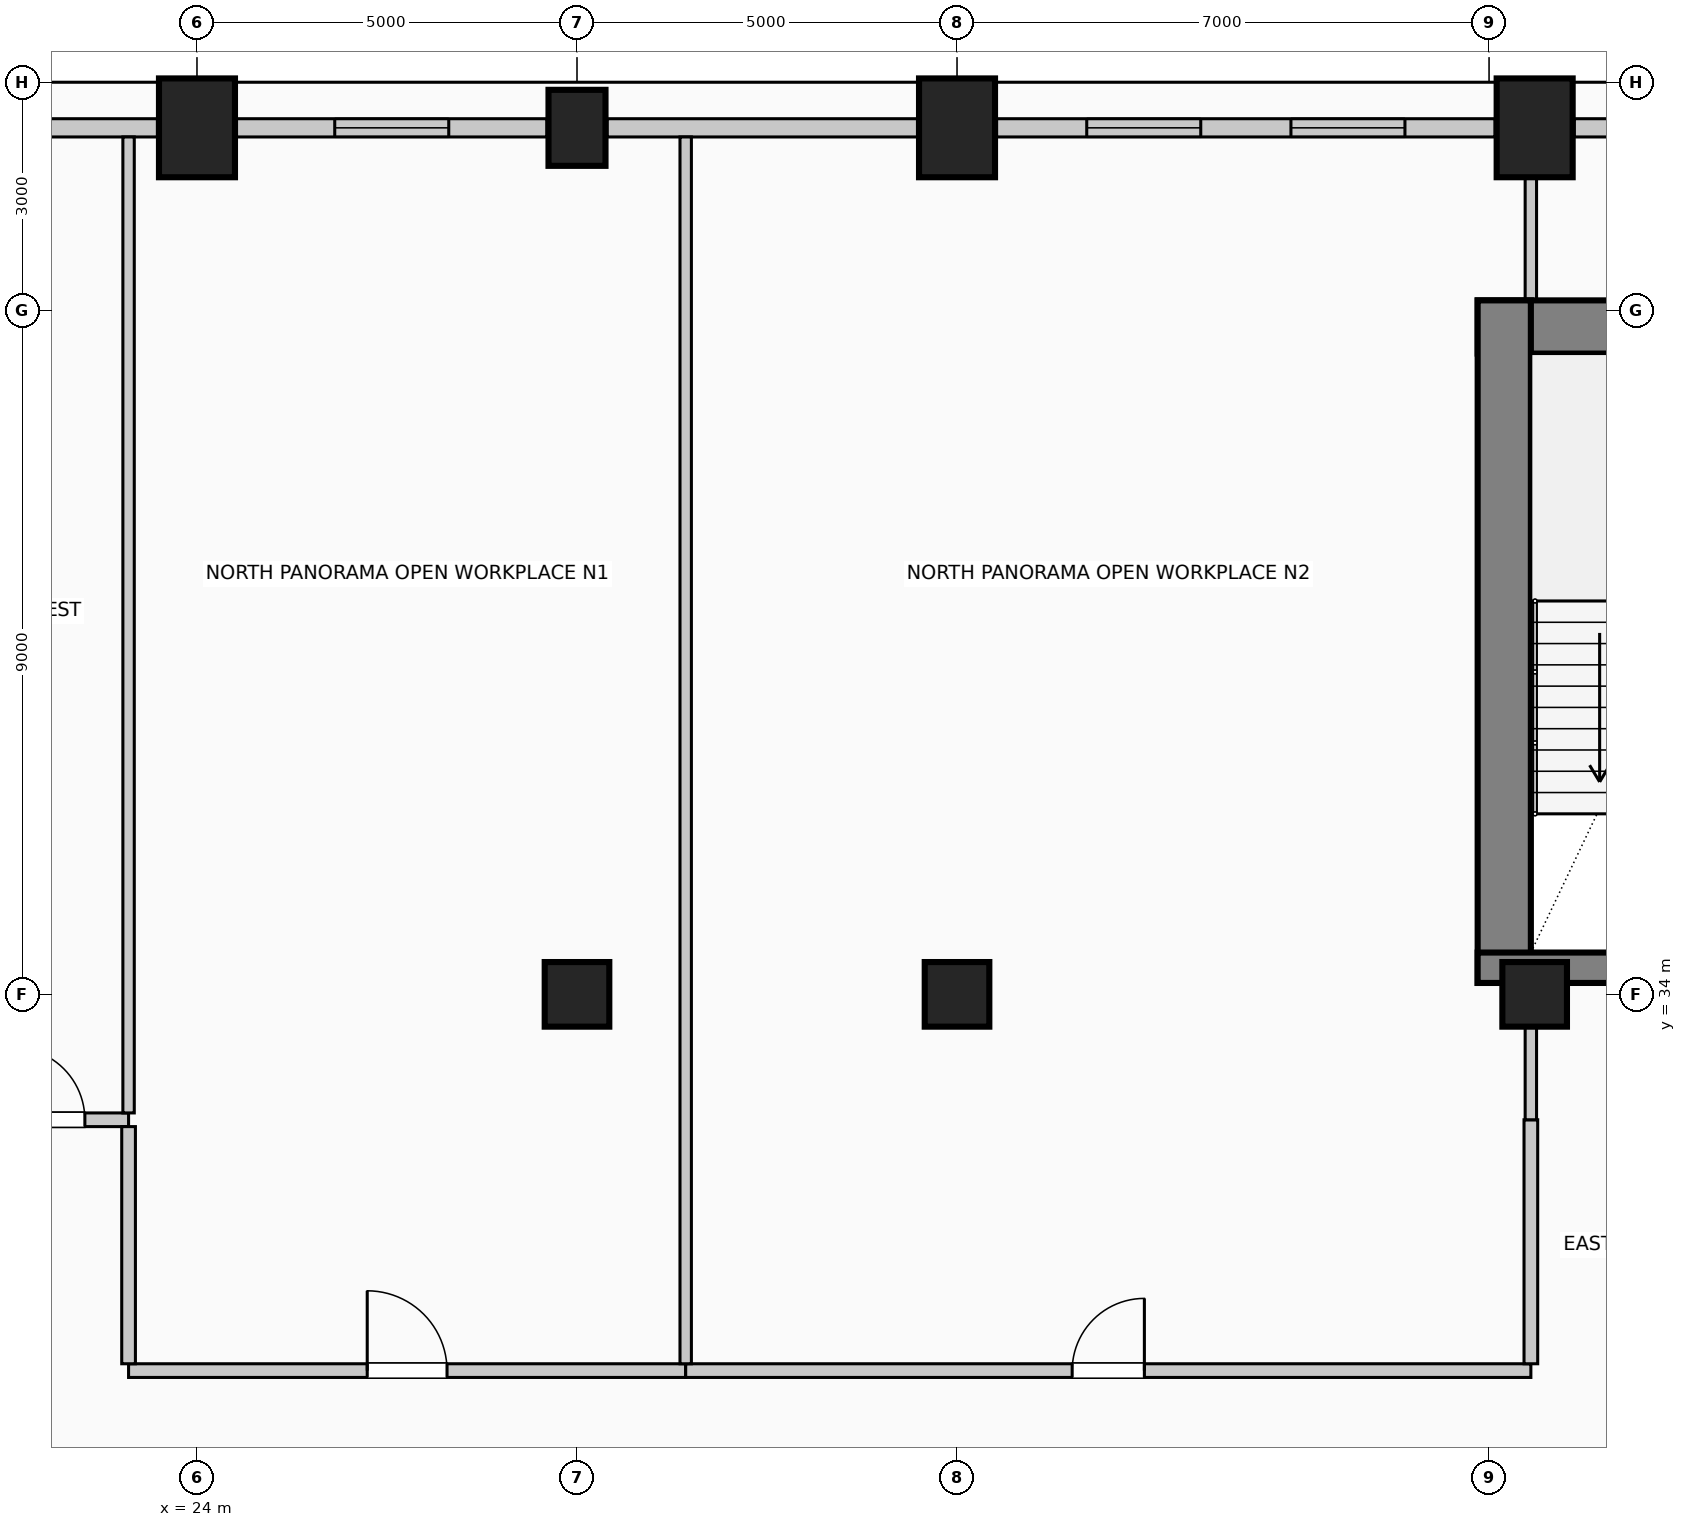
"""IFC4 building model, lengths in metres.
Left out: names, types, materials, properties, quantities, classifications, styles, units other than length and angle.
Written with IfcOpenShell. Run it as: python <this file> out.ifc"""

import sys

from ifc_helpers import new_model, si_unit, direction, frame, frame_2d, origin, origin_2d, place, context, subcontext, project, spatial, rectangle, circle, extrude, element, fill, save


model = new_model("IFC4")
c1 = context("Model", 3, precision=1e-05, world=origin(), true_north=direction((0.0, 1.0)))
c2 = subcontext(c1, "Body", "Model", "MODEL_VIEW")
j1 = project(units=[si_unit("LENGTHUNIT", "METRE"), si_unit("PLANEANGLEUNIT", "RADIAN")], contexts=[c1])
p1 = place(None, origin())
s1 = spatial("IfcSite", under=j1, at=p1, CompositionType="ELEMENT")
p2 = place(p1, origin())
s2 = spatial("IfcBuilding", under=s1, at=p2, CompositionType="ELEMENT")
p3 = place(p2, frame((0.0, 0.0, 252.6)))
s3 = spatial("IfcBuildingStorey", under=s2, at=p3, CompositionType="ELEMENT", Elevation=252.6)
p4 = place(p3, frame((40.85, 42.78, 0.0), z_axis=(0.0, 0.0, 1.0), x_axis=(1.0, 0.0, 0.0)))
e1 = element("IfcWall", 1, at=p4, inside=s3, PredefinedType="SHEAR", context=c2, shape_type="SweptSolid", body=[
    extrude(rectangle(XDim=14.3, YDim=0.7, at=frame_2d((7.15, 0.0))), origin(), (0.0, 0.0, 1.0), 4.0),
])
p5 = place(p3, frame((41.2, 34.15, 0.0), z_axis=(0.0, 0.0, 1.0), x_axis=(0.0, 1.0, 0.0)))
e2 = element("IfcWall", 2, at=p5, inside=s3, PredefinedType="SHEAR", context=c2, shape_type="SweptSolid", body=[
    extrude(rectangle(XDim=8.98, YDim=0.7, at=frame_2d((4.49, 0.0))), origin(), (0.0, 0.0, 1.0), 4.0),
])
p6 = place(p3, frame((40.85, 34.35, 0.0), z_axis=(0.0, 0.0, 1.0), x_axis=(1.0, 0.0, 0.0)))
e3 = element("IfcWall", 3, at=p6, inside=s3, PredefinedType="SHEAR", context=c2, shape_type="SweptSolid", body=[
    extrude(rectangle(XDim=4.86, YDim=0.4, at=frame_2d((2.43, 0.0))), origin(), (0.0, 0.0, 1.0), 4.0),
])
p7 = place(p6, frame((2.4, 0.0, 0.0)))
e4 = element("IfcOpeningElement", 4, at=p7, cuts=e3, PredefinedType="OPENING", context=c2, shape_type="SweptSolid", body=[
    extrude(rectangle(XDim=1.15, YDim=2.2, at=frame_2d((0.575, 1.1))), frame((0.0, 0.21, 0.0), z_axis=(0.0, -1.0, 0.0), x_axis=(1.0, 0.0, 0.0)), (0.0, 0.0, 1.0), 0.42),
])
p8 = place(p3, frame((24.0, 45.4, 0.0), z_axis=(0.0, 0.0, 1.0), x_axis=(1.0, 0.0, 0.0)))
e5 = element("IfcColumn", 5, at=p8, inside=s3, PredefinedType="COLUMN", context=c2, shape_type="SweptSolid", body=[
    extrude(rectangle(XDim=1.0, YDim=1.3, at=origin_2d()), origin(), (0.0, 0.0, 1.0), 4.0),
])
p9 = place(p3, frame((29.0, 45.4, 0.0), z_axis=(0.0, 0.0, 1.0), x_axis=(1.0, 0.0, 0.0)))
e6 = element("IfcColumn", 6, at=p9, inside=s3, PredefinedType="COLUMN", context=c2, shape_type="SweptSolid", body=[
    extrude(rectangle(XDim=0.75, YDim=1.0, at=origin_2d()), origin(), (0.0, 0.0, 1.0), 4.0),
])
for number, where, z_axis, x_axis in (
    (7, (34.0, 45.4, 0.0), (0.0, 0.0, 1.0), (1.0, 0.0, 0.0)),
    (8, (41.6, 45.4, 0.0), (0.0, 0.0, 1.0), (1.0, 0.0, 0.0)),
):
    element("IfcColumn", number, at=place(p3, frame(where, z_axis=z_axis, x_axis=x_axis)), inside=s3, PredefinedType="COLUMN", context=c2, shape_type="SweptSolid", body=[
        extrude(rectangle(XDim=1.0, YDim=1.3, at=origin_2d()), origin(), (0.0, 0.0, 1.0), 4.0),
    ])
for number, where, z_axis, x_axis in (
    (9, (29.0, 34.0, 0.0), (0.0, 0.0, 1.0), (1.0, 0.0, 0.0)),
    (10, (41.6, 34.0, 0.0), (0.0, 0.0, 1.0), (1.0, 0.0, 0.0)),
    (11, (34.0, 34.0, 0.0), (0.0, 0.0, 1.0), (1.0, 0.0, 0.0)),
):
    element("IfcColumn", number, at=place(p3, frame(where, z_axis=z_axis, x_axis=x_axis)), inside=s3, PredefinedType="COLUMN", context=c2, shape_type="SweptSolid", body=[
        extrude(circle(Radius=0.425, at=origin_2d()), origin(), (0.0, 0.0, 1.0), 4.0),
    ])
p10 = place(p3, frame((16.92, 45.4, 0.0), z_axis=(0.0, 0.0, 1.0), x_axis=(1.0, 0.0, 0.0)))
e12 = element("IfcWall", 12, at=p10, inside=s3, PredefinedType="SOLIDWALL", context=c2, shape_type="SweptSolid", body=[
    extrude(rectangle(XDim=6.56, YDim=0.24, at=frame_2d((3.28, 0.0))), origin(), (0.0, 0.0, 1.0), 3.0),
])
p11 = place(p3, frame((24.52, 45.4, 0.0), z_axis=(0.0, 0.0, 1.0), x_axis=(1.0, 0.0, 0.0)))
e13 = element("IfcWall", 13, at=p11, inside=s3, PredefinedType="SOLIDWALL", context=c2, shape_type="SweptSolid", body=[
    extrude(rectangle(XDim=4.085, YDim=0.24, at=frame_2d((2.042, 0.0))), origin(), (0.0, 0.0, 1.0), 3.0),
])
p12 = place(p11, frame((1.292, 0.0, 0.42)))
e14 = element("IfcOpeningElement", 14, at=p12, cuts=e13, PredefinedType="OPENING", context=c2, shape_type="SweptSolid", body=[
    extrude(rectangle(XDim=1.5, YDim=2.2, at=frame_2d((0.75, 1.1))), frame((0.0, 0.13, 0.0), z_axis=(0.0, -1.0, 0.0), x_axis=(1.0, 0.0, 0.0)), (0.0, 0.0, 1.0), 0.26),
])
p13 = place(p3, frame((29.395, 45.4, 0.0), z_axis=(0.0, 0.0, 1.0), x_axis=(1.0, 0.0, 0.0)))
e15 = element("IfcWall", 15, at=p13, inside=s3, PredefinedType="SOLIDWALL", context=c2, shape_type="SweptSolid", body=[
    extrude(rectangle(XDim=4.085, YDim=0.24, at=frame_2d((2.042, 0.0))), origin(), (0.0, 0.0, 1.0), 3.0),
])
p14 = place(p3, frame((34.52, 45.4, 0.0), z_axis=(0.0, 0.0, 1.0), x_axis=(1.0, 0.0, 0.0)))
e16 = element("IfcWall", 16, at=p14, inside=s3, PredefinedType="SOLIDWALL", context=c2, shape_type="SweptSolid", body=[
    extrude(rectangle(XDim=6.56, YDim=0.24, at=frame_2d((3.28, 0.0))), origin(), (0.0, 0.0, 1.0), 3.0),
])
p15 = place(p14, frame((1.187, 0.0, 0.42)))
e17 = element("IfcOpeningElement", 17, at=p15, cuts=e16, PredefinedType="OPENING", context=c2, shape_type="SweptSolid", body=[
    extrude(rectangle(XDim=1.5, YDim=2.2, at=frame_2d((0.75, 1.1))), frame((0.0, 0.13, 0.0), z_axis=(0.0, -1.0, 0.0), x_axis=(1.0, 0.0, 0.0)), (0.0, 0.0, 1.0), 0.26),
])
p16 = place(p14, frame((3.873, 0.0, 0.42)))
e18 = element("IfcOpeningElement", 18, at=p16, cuts=e16, PredefinedType="OPENING", context=c2, shape_type="SweptSolid", body=[
    extrude(rectangle(XDim=1.5, YDim=2.2, at=frame_2d((0.75, 1.1))), frame((0.0, 0.13, 0.0), z_axis=(0.0, -1.0, 0.0), x_axis=(1.0, 0.0, 0.0)), (0.0, 0.0, 1.0), 0.26),
])
p17 = place(p3, frame((42.12, 45.4, 0.0), z_axis=(0.0, 0.0, 1.0), x_axis=(1.0, 0.0, 0.0)))
e19 = element("IfcWall", 19, at=p17, inside=s3, PredefinedType="SOLIDWALL", context=c2, shape_type="SweptSolid", body=[
    extrude(rectangle(XDim=1.485, YDim=0.24, at=frame_2d((0.742, 0.0))), origin(), (0.0, 0.0, 1.0), 3.0),
])
p18 = place(p3, frame((23.1, 29.05, 0.0), z_axis=(0.0, 0.0, 1.0), x_axis=(1.0, 0.0, 0.0)))
e20 = element("IfcWall", 20, at=p18, inside=s3, PredefinedType="PARTITIONING", context=c2, shape_type="SweptSolid", body=[
    extrude(rectangle(XDim=7.33, YDim=0.18, at=frame_2d((3.665, 0.0))), origin(), (0.0, 0.0, 1.0), 3.75),
])
p19 = place(p18, frame((3.14, 0.0, 0.0)))
e21 = element("IfcOpeningElement", 21, at=p19, cuts=e20, PredefinedType="OPENING", context=c2, shape_type="SweptSolid", body=[
    extrude(rectangle(XDim=1.05, YDim=2.15, at=frame_2d((0.525, 1.075))), frame((0.0, 0.1, 0.0), z_axis=(0.0, -1.0, 0.0), x_axis=(1.0, 0.0, 0.0)), (0.0, 0.0, 1.0), 0.2),
])
p20 = place(p3, frame((30.43, 29.05, 0.0), z_axis=(0.0, 0.0, 1.0), x_axis=(1.0, 0.0, 0.0)))
e22 = element("IfcWall", 22, at=p20, inside=s3, PredefinedType="PARTITIONING", context=c2, shape_type="SweptSolid", body=[
    extrude(rectangle(XDim=11.12, YDim=0.18, at=frame_2d((5.56, 0.0))), origin(), (0.0, 0.0, 1.0), 3.75),
])
p21 = place(p20, frame((5.085, 0.0, 0.0)))
e23 = element("IfcOpeningElement", 23, at=p21, cuts=e22, PredefinedType="OPENING", context=c2, shape_type="SweptSolid", body=[
    extrude(rectangle(XDim=0.95, YDim=2.15, at=frame_2d((0.475, 1.075))), frame((0.0, 0.1, 0.0), z_axis=(0.0, -1.0, 0.0), x_axis=(1.0, 0.0, 0.0)), (0.0, 0.0, 1.0), 0.2),
])
p22 = place(p3, frame((21.0, 32.35, 0.0), z_axis=(0.0, 0.0, 1.0), x_axis=(1.0, 0.0, 0.0)))
e24 = element("IfcWall", 24, at=p22, inside=s3, PredefinedType="PARTITIONING", context=c2, shape_type="SweptSolid", body=[
    extrude(rectangle(XDim=2.1, YDim=0.18, at=frame_2d((1.05, 0.0))), origin(), (0.0, 0.0, 1.0), 3.75),
])
p23 = place(p22, frame((0.575, 0.0, 0.0)))
e25 = element("IfcOpeningElement", 25, at=p23, cuts=e24, PredefinedType="OPENING", context=c2, shape_type="SweptSolid", body=[
    extrude(rectangle(XDim=0.95, YDim=2.15, at=frame_2d((0.475, 1.075))), frame((0.0, 0.1, 0.0), z_axis=(0.0, -1.0, 0.0), x_axis=(1.0, 0.0, 0.0)), (0.0, 0.0, 1.0), 0.2),
])
p24 = place(p3, frame((23.1, 29.14, 0.0), z_axis=(0.0, 0.0, 1.0), x_axis=(0.0, 1.0, 0.0)))
e26 = element("IfcWall", 26, at=p24, inside=s3, PredefinedType="PARTITIONING", context=c2, shape_type="SweptSolid", body=[
    extrude(rectangle(XDim=3.12, YDim=0.18, at=frame_2d((1.56, 0.0))), origin(), (0.0, 0.0, 1.0), 3.75),
])
p25 = place(p3, frame((23.1, 32.44, 0.0), z_axis=(0.0, 0.0, 1.0), x_axis=(0.0, 1.0, 0.0)))
e27 = element("IfcWall", 27, at=p25, inside=s3, PredefinedType="PARTITIONING", context=c2, shape_type="SweptSolid", body=[
    extrude(rectangle(XDim=12.84, YDim=0.15, at=frame_2d((6.42, 0.0))), origin(), (0.0, 0.0, 1.0), 3.75),
])
p26 = place(p3, frame((30.43, 29.14, 0.0), z_axis=(0.0, 0.0, 1.0), x_axis=(0.0, 1.0, 0.0)))
e28 = element("IfcWall", 28, at=p26, inside=s3, PredefinedType="PARTITIONING", context=c2, shape_type="SweptSolid", body=[
    extrude(rectangle(XDim=16.14, YDim=0.15, at=frame_2d((8.07, 0.0))), origin(), (0.0, 0.0, 1.0), 3.75),
])
p27 = place(p3, frame((41.55, 29.14, 0.0), z_axis=(0.0, 0.0, 1.0), x_axis=(0.0, 1.0, 0.0)))
e29 = element("IfcWall", 29, at=p27, inside=s3, PredefinedType="PARTITIONING", context=c2, shape_type="SweptSolid", body=[
    extrude(rectangle(XDim=3.21, YDim=0.18, at=frame_2d((1.605, 0.0))), origin(), (0.0, 0.0, 1.0), 3.195),
])
p28 = place(p3, frame((41.55, 32.35, 0.0), z_axis=(0.0, 0.0, 1.0), x_axis=(0.0, 1.0, 0.0)))
e30 = element("IfcWall", 30, at=p28, inside=s3, PredefinedType="PARTITIONING", context=c2, shape_type="SweptSolid", body=[
    extrude(rectangle(XDim=1.225, YDim=0.15, at=frame_2d((0.612, 0.0))), origin(), (0.0, 0.0, 1.0), 3.195),
])
p29 = place(p3, frame((41.55, 43.13, 0.0), z_axis=(0.0, 0.0, 1.0), x_axis=(0.0, 1.0, 0.0)))
e31 = element("IfcWall", 31, at=p29, inside=s3, PredefinedType="PARTITIONING", context=c2, shape_type="SweptSolid", body=[
    extrude(rectangle(XDim=1.62, YDim=0.15, at=frame_2d((0.81, 0.0))), origin(), (0.0, 0.0, 1.0), 3.75),
])
p30 = place(p12, origin())
e32 = element("IfcWindow", 32, at=p30, inside=s3, PartitioningType="SINGLE_PANEL", PredefinedType="WINDOW", context=c2, shape_type="SweptSolid", body=[
    extrude(rectangle(XDim=1.5, YDim=2.2, at=frame_2d((0.75, 1.1))), frame((0.0, 0.03, 0.0), z_axis=(0.0, -1.0, 0.0), x_axis=(1.0, 0.0, 0.0)), (0.0, 0.0, 1.0), 0.06),
])
fill(e14, e32)
p31 = place(p15, origin())
e33 = element("IfcWindow", 33, at=p31, inside=s3, PartitioningType="SINGLE_PANEL", PredefinedType="WINDOW", context=c2, shape_type="SweptSolid", body=[
    extrude(rectangle(XDim=1.5, YDim=2.2, at=frame_2d((0.75, 1.1))), frame((0.0, 0.03, 0.0), z_axis=(0.0, -1.0, 0.0), x_axis=(1.0, 0.0, 0.0)), (0.0, 0.0, 1.0), 0.06),
])
fill(e17, e33)
p32 = place(p16, origin())
e34 = element("IfcWindow", 34, at=p32, inside=s3, PartitioningType="SINGLE_PANEL", PredefinedType="WINDOW", context=c2, shape_type="SweptSolid", body=[
    extrude(rectangle(XDim=1.5, YDim=2.2, at=frame_2d((0.75, 1.1))), frame((0.0, 0.03, 0.0), z_axis=(0.0, -1.0, 0.0), x_axis=(1.0, 0.0, 0.0)), (0.0, 0.0, 1.0), 0.06),
])
fill(e18, e34)
p33 = place(p19, origin())
e35 = element("IfcDoor", 35, at=p33, inside=s3, OperationType="SINGLE_SWING_LEFT", PredefinedType="DOOR", context=c2, shape_type="SweptSolid", body=[
    extrude(rectangle(XDim=1.05, YDim=2.15, at=frame_2d((0.525, 1.075))), frame((0.0, 0.025, 0.0), z_axis=(0.0, -1.0, 0.0), x_axis=(1.0, 0.0, 0.0)), (0.0, 0.0, 1.0), 0.05),
])
fill(e21, e35)
p34 = place(p21, origin())
e36 = element("IfcDoor", 36, at=p34, inside=s3, OperationType="SINGLE_SWING_RIGHT", PredefinedType="DOOR", context=c2, shape_type="SweptSolid", body=[
    extrude(rectangle(XDim=0.95, YDim=2.15, at=frame_2d((0.475, 1.075))), frame((0.0, 0.025, 0.0), z_axis=(0.0, -1.0, 0.0), x_axis=(1.0, 0.0, 0.0)), (0.0, 0.0, 1.0), 0.05),
])
fill(e23, e36)
p35 = place(p23, origin())
e37 = element("IfcDoor", 37, at=p35, inside=s3, OperationType="SINGLE_SWING_LEFT", PredefinedType="DOOR", context=c2, shape_type="SweptSolid", body=[
    extrude(rectangle(XDim=0.95, YDim=2.15, at=frame_2d((0.475, 1.075))), frame((0.0, 0.025, 0.0), z_axis=(0.0, -1.0, 0.0), x_axis=(1.0, 0.0, 0.0)), (0.0, 0.0, 1.0), 0.05),
])
fill(e25, e37)
save(model, sys.argv[1])
